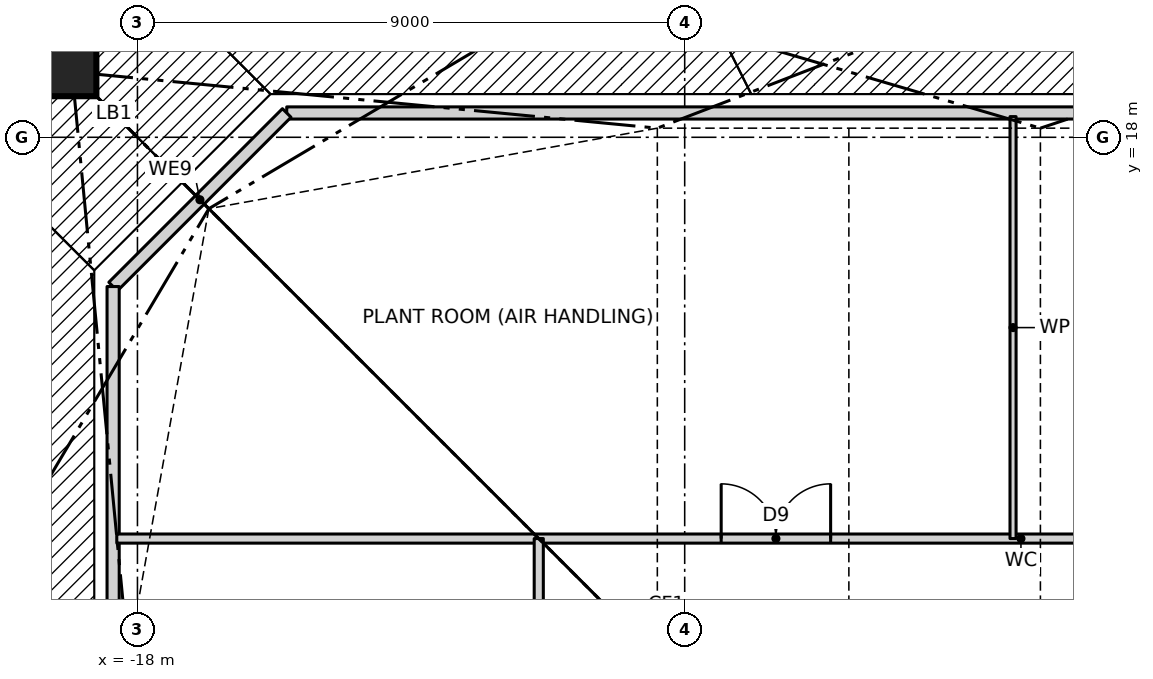
"""IFC4 building model, lengths in metres.
Left out: names, types, materials, properties, quantities, classifications, styles, units other than length and angle.
Written with IfcOpenShell. Run it as: python <this file> out.ifc"""

import sys

from ifc_helpers import new_model, si_unit, direction, frame, frame_2d, origin, origin_2d, place, context, subcontext, project, spatial, rectangle, hollow_rectangle, extrude, clip, halfspace, element, fill, save


model = new_model("IFC4")
c1 = context("Model", 3, precision=1e-05, world=origin(), true_north=direction((0.0, 1.0)))
c2 = subcontext(c1, "Body", "Model", "MODEL_VIEW")
j1 = project(units=[si_unit("LENGTHUNIT", "METRE"), si_unit("PLANEANGLEUNIT", "RADIAN")], contexts=[c1])
p1 = place(None, origin())
s1 = spatial("IfcSite", under=j1, at=p1, CompositionType="ELEMENT")
p2 = place(p1, origin())
s2 = spatial("IfcBuilding", under=s1, at=p2, CompositionType="ELEMENT")
p3 = place(p2, frame((0.0, 0.0, 143.5)))
s3 = spatial("IfcBuildingStorey", under=s2, at=p3, CompositionType="ELEMENT", Elevation=143.5)
p4 = place(p3, frame((-3.6, 20.4, 0.0), z_axis=(0.07008242466, -0.350260100688, 0.934026935168), x_axis=(0.980564303347, 0.196197979098, 0.0)))
e1 = element("IfcColumn", 1, at=p4, inside=s3, PredefinedType="COLUMN", context=c2, shape_type="Clipping", body=[
    clip(clip(extrude(hollow_rectangle(XDim=0.8, YDim=0.8, WallThickness=0.07, at=origin_2d()), origin(), (0.0, 0.0, 1.0), 6.424), halfspace(frame((0.0, 0.0, 0.0), z_axis=(0.0, -0.35720258171, -0.934026935168), x_axis=(0.980564303347, -0.183254197104, 0.07008242466)), False)), halfspace(frame((0.0, 2.143, 5.604), z_axis=(0.0, 0.35720258171, 0.934026935168), x_axis=(0.980564303347, -0.183254197104, 0.07008242466)), False)),
])
p5 = place(p3, frame((-10.8, 20.4, 0.0), z_axis=(0.206163197348, -0.343580475001, 0.916214600002), x_axis=(0.857476506072, 0.514523120505, 0.0)))
e2 = element("IfcColumn", 2, at=p5, inside=s3, PredefinedType="COLUMN", context=c2, shape_type="Clipping", body=[
    clip(clip(extrude(hollow_rectangle(XDim=0.8, YDim=0.8, WallThickness=0.07, at=origin_2d()), origin(), (0.0, 0.0, 1.0), 6.549), halfspace(frame((0.0, 0.0, 0.0), z_axis=(0.0, -0.400687916891, -0.916214600002), x_axis=(0.857476506072, -0.471413595046, 0.206163197348)), False)), halfspace(frame((0.0, 2.404, 5.497), z_axis=(0.0, 0.400687916891, 0.916214600002), x_axis=(0.857476506072, -0.471413595046, 0.206163197348)), False)),
])
p6 = place(p3, frame((-19.076, 19.076, 0.0), z_axis=(0.331294578225, -0.331294578225, 0.883452208599), x_axis=(0.707106781187, 0.707106781187, 0.0)))
e3 = element("IfcColumn", 3, at=p6, inside=s3, PredefinedType="COLUMN", context=c2, shape_type="Clipping", body=[
    clip(clip(extrude(hollow_rectangle(XDim=0.8, YDim=0.8, WallThickness=0.18, at=origin_2d()), origin(), (0.0, 0.0, 1.0), 6.792), halfspace(frame((0.0, 0.0, 0.0), z_axis=(0.0, -0.468521285666, -0.883452208599), x_axis=(0.707106781187, -0.624695047554, 0.331294578225)), False)), halfspace(frame((0.0, 2.811, 5.301), z_axis=(0.0, 0.468521285666, 0.883452208599), x_axis=(0.707106781187, -0.624695047554, 0.331294578225)), False)),
])
p7 = place(p3, frame((-20.4, 10.8, 0.0), z_axis=(0.343580475001, -0.206163197348, 0.916214600002), x_axis=(0.514523120505, 0.857476506072, 0.0)))
e4 = element("IfcColumn", 4, at=p7, inside=s3, PredefinedType="COLUMN", context=c2, shape_type="Clipping", body=[
    clip(clip(extrude(hollow_rectangle(XDim=0.8, YDim=0.8, WallThickness=0.07, at=origin_2d()), origin(), (0.0, 0.0, 1.0), 6.549), halfspace(frame((0.0, 0.0, 0.0), z_axis=(0.0, -0.400687916891, -0.916214600002), x_axis=(0.514523120505, -0.785632494022, 0.343580475001)), False)), halfspace(frame((0.0, 2.404, 5.497), z_axis=(0.0, 0.400687916891, 0.916214600002), x_axis=(0.514523120505, -0.785632494022, 0.343580475001)), False)),
])
p8 = place(p3, frame((15.545, 18.4, 0.0), z_axis=(0.0, 0.0, 1.0), x_axis=(-1.0, 0.0, 0.0)))
e5 = element("IfcWall", 5, at=p8, inside=s3, PredefinedType="PARTITIONING", context=c2, shape_type="SweptSolid", body=[
    extrude(rectangle(XDim=31.09, YDim=0.2, at=frame_2d((15.545, 0.0))), origin(), (0.0, 0.0, 1.0), 5.7),
])
p9 = place(p3, frame((-15.545, 18.4, 0.0), z_axis=(0.0, 0.0, 1.0), x_axis=(-0.707106781187, -0.707106781187, 0.0)))
e6 = element("IfcWall", 6, at=p9, inside=s3, PredefinedType="PARTITIONING", context=c2, shape_type="SweptSolid", body=[
    extrude(rectangle(XDim=4.038, YDim=0.2, at=frame_2d((2.019, 0.0))), origin(), (0.0, 0.0, 1.0), 5.7),
])
p10 = place(p3, frame((-18.4, 15.545, 0.0), z_axis=(0.0, 0.0, 1.0), x_axis=(0.0, -1.0, 0.0)))
e7 = element("IfcWall", 7, at=p10, inside=s3, PredefinedType="PARTITIONING", context=c2, shape_type="SweptSolid", body=[
    extrude(rectangle(XDim=31.09, YDim=0.2, at=frame_2d((15.545, 0.0))), origin(), (0.0, 0.0, 1.0), 5.7),
])
p11 = place(p3, frame((-18.34, 11.4, 0.0), z_axis=(0.0, 0.0, 1.0), x_axis=(1.0, 0.0, 0.0)))
e8 = element("IfcWall", 8, at=p11, inside=s3, PredefinedType="PARTITIONING", context=c2, shape_type="SweptSolid", body=[
    extrude(rectangle(XDim=29.74, YDim=0.15, at=frame_2d((14.87, 0.0))), origin(), (0.0, 0.0, 1.0), 5.77),
])
p12 = place(p11, frame((25.34, 0.0, 0.0)))
e9 = element("IfcOpeningElement", 9, at=p12, cuts=e8, PredefinedType="OPENING", context=c2, shape_type="SweptSolid", body=[
    extrude(rectangle(XDim=1.8, YDim=2.1, at=frame_2d((0.9, 1.05))), frame((0.0, 0.085, 0.0), z_axis=(0.0, -1.0, 0.0), x_axis=(1.0, 0.0, 0.0)), (0.0, 0.0, 1.0), 0.17),
])
p13 = place(p11, frame((17.84, 0.0, 0.0)))
e10 = element("IfcOpeningElement", 10, at=p13, cuts=e8, PredefinedType="OPENING", context=c2, shape_type="SweptSolid", body=[
    extrude(rectangle(XDim=1.8, YDim=2.1, at=frame_2d((0.9, 1.05))), frame((0.0, 0.085, 0.0), z_axis=(0.0, -1.0, 0.0), x_axis=(1.0, 0.0, 0.0)), (0.0, 0.0, 1.0), 0.17),
])
p14 = place(p11, frame((9.94, 0.0, 0.0)))
e11 = element("IfcOpeningElement", 11, at=p14, cuts=e8, PredefinedType="OPENING", context=c2, shape_type="SweptSolid", body=[
    extrude(rectangle(XDim=1.8, YDim=2.1, at=frame_2d((0.9, 1.05))), frame((0.0, 0.085, 0.0), z_axis=(0.0, -1.0, 0.0), x_axis=(1.0, 0.0, 0.0)), (0.0, 0.0, 1.0), 0.17),
])
p15 = place(p3, frame((-3.6, 11.4, 0.0), z_axis=(0.0, 0.0, 1.0), x_axis=(0.0, 1.0, 0.0)))
e12 = element("IfcWall", 12, at=p15, inside=s3, PredefinedType="PARTITIONING", context=c2, shape_type="SweptSolid", body=[
    extrude(rectangle(XDim=6.94, YDim=0.1, at=frame_2d((3.47, 0.0))), origin(), (0.0, 0.0, 1.0), 5.77),
])
p16 = place(p3, frame((-11.4, -18.34, 0.0), z_axis=(0.0, 0.0, 1.0), x_axis=(0.0, 1.0, 0.0)))
e13 = element("IfcWall", 13, at=p16, inside=s3, PredefinedType="PARTITIONING", context=c2, shape_type="SweptSolid", body=[
    extrude(rectangle(XDim=29.74, YDim=0.15, at=frame_2d((14.87, 0.0))), origin(), (0.0, 0.0, 1.0), 5.77),
])
p17 = place(p16, frame((17.44, 0.0, 0.0)))
e14 = element("IfcOpeningElement", 14, at=p17, cuts=e13, PredefinedType="OPENING", context=c2, shape_type="SweptSolid", body=[
    extrude(rectangle(XDim=1.8, YDim=2.1, at=frame_2d((0.9, 1.05))), frame((0.0, 0.085, 0.0), z_axis=(0.0, -1.0, 0.0), x_axis=(1.0, 0.0, 0.0)), (0.0, 0.0, 1.0), 0.17),
])
p18 = place(p14, origin())
e15 = element("IfcDoor", 15, at=p18, inside=s3, OperationType="DOUBLE_DOOR_SINGLE_SWING", PredefinedType="DOOR", context=c2, shape_type="SweptSolid", body=[
    extrude(rectangle(XDim=1.8, YDim=2.1, at=frame_2d((0.9, 1.05))), frame((0.0, 0.025, 0.0), z_axis=(0.0, -1.0, 0.0), x_axis=(1.0, 0.0, 0.0)), (0.0, 0.0, 1.0), 0.05),
])
fill(e11, e15)
save(model, sys.argv[1])
